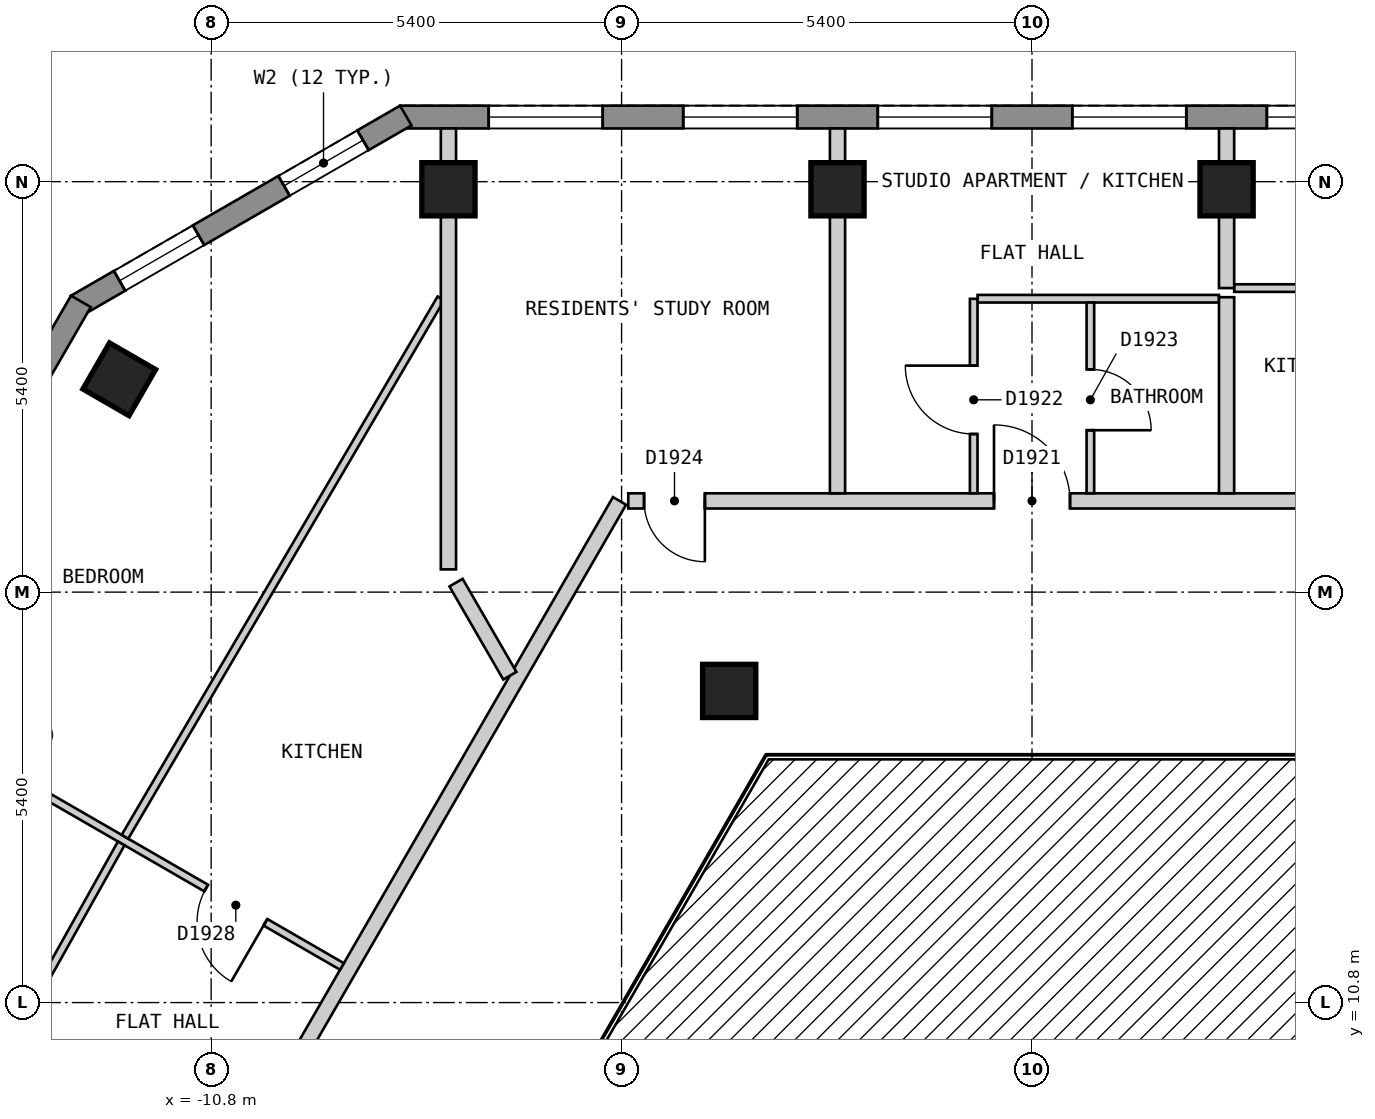
"""IFC4 building model, lengths in metres.
Left out: names, types, materials, properties, quantities, classifications, styles, units other than length and angle.
Written with IfcOpenShell. Run it as: python <this file> out.ifc"""

import sys

from ifc_helpers import new_model, si_unit, direction, frame, frame_2d, origin, origin_2d, place, context, subcontext, project, spatial, polyline, rectangle, outline, extrude, element, fill, save


model = new_model("IFC4")
c1 = context("Model", 3, precision=1e-05, world=origin(), true_north=direction((0.0, 1.0)))
c2 = subcontext(c1, "Body", "Model", "MODEL_VIEW")
j1 = project(units=[si_unit("LENGTHUNIT", "METRE"), si_unit("PLANEANGLEUNIT", "RADIAN")], contexts=[c1])
p1 = place(None, origin())
s1 = spatial("IfcSite", under=j1, at=p1, CompositionType="ELEMENT")
p2 = place(p1, origin())
s2 = spatial("IfcBuilding", under=s1, at=p2, CompositionType="ELEMENT")
p3 = place(p2, frame((0.0, 0.0, 226.8)))
s3 = spatial("IfcBuildingStorey", under=s2, at=p3, CompositionType="ELEMENT", Elevation=226.8)
for number, where, z_axis, x_axis in (
    (1, (2.56, 21.5, 0.0), (0.0, 0.0, 1.0), (-1.0, 0.0, 0.0)),
    (2, (-2.559, 21.5, 0.0), (0.0, 0.0, 1.0), (-1.0, 0.0, 0.0)),
    (3, (-7.678, 21.5, 0.0), (0.0, 0.0, 1.0), (-1.0, 0.0, 0.0)),
    (4, (-12.009, 19.0, 0.0), (0.0, 0.0, 1.0), (-0.5, -0.866, 0.0)),
    (5, (-3.984, 14.9, 0.0), (0.0, 0.0, 1.0), (1.0, 0.0, 0.0)),
):
    element("IfcColumn", number, at=place(p3, frame(where, z_axis=z_axis, x_axis=x_axis)), inside=s3, PredefinedType="COLUMN", context=c2, shape_type="SweptSolid", body=[
        extrude(rectangle(XDim=0.7, YDim=0.7, at=origin_2d()), origin(), (0.0, 0.0, 1.0), 3.0),
    ])
p4 = place(p3, frame((8.314, 22.45, 0.0), z_axis=(0.0, 0.0, 1.0), x_axis=(-1.0, 0.0, 0.0)))
e6 = element("IfcWall", 6, at=p4, inside=s3, PredefinedType="SOLIDWALL", context=c2, shape_type="SweptSolid", body=[
    extrude(outline(polyline([(0.0, -0.15), (16.628, -0.15), (16.548, 0.15), (0.08, 0.15), (0.0, -0.15)])), origin(), (0.0, 0.0, 1.0), 2.7),
])
p5 = place(p4, frame((1.165, 0.0, 0.15)))
e7 = element("IfcOpeningElement", 7, at=p5, cuts=e6, PredefinedType="OPENING", context=c2, shape_type="SweptSolid", body=[
    extrude(rectangle(XDim=1.5, YDim=2.1, at=frame_2d((0.75, 1.05))), frame((0.0, 0.16, 0.0), z_axis=(0.0, -1.0, 0.0), x_axis=(1.0, 0.0, 0.0)), (0.0, 0.0, 1.0), 0.32),
])
p6 = place(p4, frame((3.724, 0.0, 0.15)))
e8 = element("IfcOpeningElement", 8, at=p6, cuts=e6, PredefinedType="OPENING", context=c2, shape_type="SweptSolid", body=[
    extrude(rectangle(XDim=1.5, YDim=2.1, at=frame_2d((0.75, 1.05))), frame((0.0, 0.16, 0.0), z_axis=(0.0, -1.0, 0.0), x_axis=(1.0, 0.0, 0.0)), (0.0, 0.0, 1.0), 0.32),
])
p7 = place(p4, frame((6.284, 0.0, 0.15)))
e9 = element("IfcOpeningElement", 9, at=p7, cuts=e6, PredefinedType="OPENING", context=c2, shape_type="SweptSolid", body=[
    extrude(rectangle(XDim=1.5, YDim=2.1, at=frame_2d((0.75, 1.05))), frame((0.0, 0.16, 0.0), z_axis=(0.0, -1.0, 0.0), x_axis=(1.0, 0.0, 0.0)), (0.0, 0.0, 1.0), 0.32),
])
p8 = place(p4, frame((8.843, 0.0, 0.15)))
e10 = element("IfcOpeningElement", 10, at=p8, cuts=e6, PredefinedType="OPENING", context=c2, shape_type="SweptSolid", body=[
    extrude(rectangle(XDim=1.5, YDim=2.1, at=frame_2d((0.75, 1.05))), frame((0.0, 0.16, 0.0), z_axis=(0.0, -1.0, 0.0), x_axis=(1.0, 0.0, 0.0)), (0.0, 0.0, 1.0), 0.32),
])
p9 = place(p4, frame((11.403, 0.0, 0.15)))
e11 = element("IfcOpeningElement", 11, at=p9, cuts=e6, PredefinedType="OPENING", context=c2, shape_type="SweptSolid", body=[
    extrude(rectangle(XDim=1.5, YDim=2.1, at=frame_2d((0.75, 1.05))), frame((0.0, 0.16, 0.0), z_axis=(0.0, -1.0, 0.0), x_axis=(1.0, 0.0, 0.0)), (0.0, 0.0, 1.0), 0.32),
])
p10 = place(p4, frame((13.962, 0.0, 0.15)))
e12 = element("IfcOpeningElement", 12, at=p10, cuts=e6, PredefinedType="OPENING", context=c2, shape_type="SweptSolid", body=[
    extrude(rectangle(XDim=1.5, YDim=2.1, at=frame_2d((0.75, 1.05))), frame((0.0, 0.16, 0.0), z_axis=(0.0, -1.0, 0.0), x_axis=(1.0, 0.0, 0.0)), (0.0, 0.0, 1.0), 0.32),
])
p11 = place(p3, frame((-8.239, 22.47, 0.0), z_axis=(0.0, 0.0, 1.0), x_axis=(-0.866022959057, -0.500004234368, 0.0)))
e13 = element("IfcWall", 13, at=p11, inside=s3, PredefinedType="SOLIDWALL", context=c2, shape_type="SweptSolid", body=[
    extrude(outline(polyline([(0.0, -0.15), (5.0, -0.15), (4.92, 0.15), (0.08, 0.15), (0.0, -0.15)])), origin(), (0.0, 0.0, 1.0), 2.7),
])
p12 = place(p11, frame((0.65, 0.0, 0.15)))
e14 = element("IfcOpeningElement", 14, at=p12, cuts=e13, PredefinedType="OPENING", context=c2, shape_type="SweptSolid", body=[
    extrude(rectangle(XDim=1.2, YDim=2.1, at=frame_2d((0.6, 1.05))), frame((0.0, 0.16, 0.0), z_axis=(0.0, -1.0, 0.0), x_axis=(1.0, 0.0, 0.0)), (0.0, 0.0, 1.0), 0.32),
])
p13 = place(p11, frame((3.149, 0.0, 0.15)))
e15 = element("IfcOpeningElement", 15, at=p13, cuts=e13, PredefinedType="OPENING", context=c2, shape_type="SweptSolid", body=[
    extrude(rectangle(XDim=1.2, YDim=2.1, at=frame_2d((0.6, 1.05))), frame((0.0, 0.16, 0.0), z_axis=(0.0, -1.0, 0.0), x_axis=(1.0, 0.0, 0.0)), (0.0, 0.0, 1.0), 0.32),
])
p14 = place(p3, frame((-12.514, 20.025, 0.0), z_axis=(0.0, 0.0, 1.0), x_axis=(-0.500003656944, -0.866023292436, 0.0)))
e16 = element("IfcWall", 16, at=p14, inside=s3, PredefinedType="SOLIDWALL", context=c2, shape_type="SweptSolid", body=[
    extrude(outline(polyline([(0.0, -0.15), (22.17, -0.15), (22.09, 0.15), (0.08, 0.15), (0.0, -0.15)])), origin(), (0.0, 0.0, 1.0), 2.7),
])
p15 = place(p14, frame((1.191, 0.0, 0.15)))
e17 = element("IfcOpeningElement", 17, at=p15, cuts=e16, PredefinedType="OPENING", context=c2, shape_type="SweptSolid", body=[
    extrude(rectangle(XDim=1.5, YDim=2.1, at=frame_2d((0.75, 1.05))), frame((0.0, 0.16, 0.0), z_axis=(0.0, -1.0, 0.0), x_axis=(1.0, 0.0, 0.0)), (0.0, 0.0, 1.0), 0.32),
])
p16 = place(p14, frame((3.804, 0.0, 0.15)))
e18 = element("IfcOpeningElement", 18, at=p16, cuts=e16, PredefinedType="OPENING", context=c2, shape_type="SweptSolid", body=[
    extrude(rectangle(XDim=1.5, YDim=2.1, at=frame_2d((0.75, 1.05))), frame((0.0, 0.16, 0.0), z_axis=(0.0, -1.0, 0.0), x_axis=(1.0, 0.0, 0.0)), (0.0, 0.0, 1.0), 0.32),
])
p17 = place(p14, frame((6.416, 0.0, 0.15)))
e19 = element("IfcOpeningElement", 19, at=p17, cuts=e16, PredefinedType="OPENING", context=c2, shape_type="SweptSolid", body=[
    extrude(rectangle(XDim=1.5, YDim=2.1, at=frame_2d((0.75, 1.05))), frame((0.0, 0.16, 0.0), z_axis=(0.0, -1.0, 0.0), x_axis=(1.0, 0.0, 0.0)), (0.0, 0.0, 1.0), 0.32),
])
p18 = place(p14, frame((9.029, 0.0, 0.15)))
e20 = element("IfcOpeningElement", 20, at=p18, cuts=e16, PredefinedType="OPENING", context=c2, shape_type="SweptSolid", body=[
    extrude(rectangle(XDim=1.5, YDim=2.1, at=frame_2d((0.75, 1.05))), frame((0.0, 0.16, 0.0), z_axis=(0.0, -1.0, 0.0), x_axis=(1.0, 0.0, 0.0)), (0.0, 0.0, 1.0), 0.32),
])
p19 = place(p14, frame((11.641, 0.0, 0.15)))
e21 = element("IfcOpeningElement", 21, at=p19, cuts=e16, PredefinedType="OPENING", context=c2, shape_type="SweptSolid", body=[
    extrude(rectangle(XDim=1.5, YDim=2.1, at=frame_2d((0.75, 1.05))), frame((0.0, 0.16, 0.0), z_axis=(0.0, -1.0, 0.0), x_axis=(1.0, 0.0, 0.0)), (0.0, 0.0, 1.0), 0.32),
])
p20 = place(p14, frame((14.254, 0.0, 0.15)))
e22 = element("IfcOpeningElement", 22, at=p20, cuts=e16, PredefinedType="OPENING", context=c2, shape_type="SweptSolid", body=[
    extrude(rectangle(XDim=1.5, YDim=2.1, at=frame_2d((0.75, 1.05))), frame((0.0, 0.16, 0.0), z_axis=(0.0, -1.0, 0.0), x_axis=(1.0, 0.0, 0.0)), (0.0, 0.0, 1.0), 0.32),
])
p21 = place(p14, frame((16.866, 0.0, 0.15)))
e23 = element("IfcOpeningElement", 23, at=p21, cuts=e16, PredefinedType="OPENING", context=c2, shape_type="SweptSolid", body=[
    extrude(rectangle(XDim=1.5, YDim=2.1, at=frame_2d((0.75, 1.05))), frame((0.0, 0.16, 0.0), z_axis=(0.0, -1.0, 0.0), x_axis=(1.0, 0.0, 0.0)), (0.0, 0.0, 1.0), 0.32),
])
p22 = place(p14, frame((19.479, 0.0, 0.15)))
e24 = element("IfcOpeningElement", 24, at=p22, cuts=e16, PredefinedType="OPENING", context=c2, shape_type="SweptSolid", body=[
    extrude(rectangle(XDim=1.5, YDim=2.1, at=frame_2d((0.75, 1.05))), frame((0.0, 0.16, 0.0), z_axis=(0.0, -1.0, 0.0), x_axis=(1.0, 0.0, 0.0)), (0.0, 0.0, 1.0), 0.32),
])
p23 = place(p3, frame((-5.312, 17.4, 0.0), z_axis=(0.0, 0.0, 1.0), x_axis=(1.0, 0.0, 0.0)))
e25 = element("IfcWall", 25, at=p23, inside=s3, PredefinedType="PARTITIONING", context=c2, shape_type="SweptSolid", body=[
    extrude(rectangle(XDim=10.739, YDim=0.2, at=frame_2d((5.37, 0.0))), origin(), (0.0, 0.0, 1.0), 2.7),
])
p24 = place(p23, frame((9.534, 0.0, 0.0)))
e26 = element("IfcOpeningElement", 26, at=p24, cuts=e25, PredefinedType="OPENING", context=c2, shape_type="SweptSolid", body=[
    extrude(rectangle(XDim=1.0, YDim=2.1, at=frame_2d((0.5, 1.05))), frame((0.0, 0.11, 0.0), z_axis=(0.0, -1.0, 0.0), x_axis=(1.0, 0.0, 0.0)), (0.0, 0.0, 1.0), 0.22),
])
p25 = place(p23, frame((4.812, 0.0, 0.0)))
e27 = element("IfcOpeningElement", 27, at=p25, cuts=e25, PredefinedType="OPENING", context=c2, shape_type="SweptSolid", body=[
    extrude(rectangle(XDim=1.0, YDim=2.1, at=frame_2d((0.5, 1.05))), frame((0.0, 0.11, 0.0), z_axis=(0.0, -1.0, 0.0), x_axis=(1.0, 0.0, 0.0)), (0.0, 0.0, 1.0), 0.22),
])
p26 = place(p23, frame((0.208, 0.0, 0.0)))
e28 = element("IfcOpeningElement", 28, at=p26, cuts=e25, PredefinedType="OPENING", context=c2, shape_type="SweptSolid", body=[
    extrude(rectangle(XDim=0.8, YDim=2.1, at=frame_2d((0.4, 1.05))), frame((0.0, 0.11, 0.0), z_axis=(0.0, -1.0, 0.0), x_axis=(1.0, 0.0, 0.0)), (0.0, 0.0, 1.0), 0.22),
])
p27 = place(p3, frame((-10.854, 8.0, 0.0), z_axis=(0.0, 0.0, 1.0), x_axis=(0.499997637144, 0.866026767976, 0.0)))
e29 = element("IfcWall", 29, at=p27, inside=s3, PredefinedType="PARTITIONING", context=c2, shape_type="SweptSolid", body=[
    extrude(rectangle(XDim=10.854, YDim=0.2, at=frame_2d((5.427, 0.0))), origin(), (0.0, 0.0, 1.0), 2.7),
])
p28 = place(p27, frame((0.612, 0.0, 0.0)))
e30 = element("IfcOpeningElement", 30, at=p28, cuts=e29, PredefinedType="OPENING", context=c2, shape_type="SweptSolid", body=[
    extrude(rectangle(XDim=1.0, YDim=2.1, at=frame_2d((0.5, 1.05))), frame((0.0, 0.11, 0.0), z_axis=(0.0, -1.0, 0.0), x_axis=(1.0, 0.0, 0.0)), (0.0, 0.0, 1.0), 0.22),
])
p29 = place(p3, frame((-15.314, 14.875, 0.0), z_axis=(0.0, 0.0, 1.0), x_axis=(0.866001485781, -0.500041424909, 0.0)))
e31 = element("IfcWall", 31, at=p29, inside=s3, PredefinedType="PARTITIONING", context=c2, shape_type="SweptSolid", body=[
    extrude(rectangle(XDim=7.2, YDim=0.1, at=frame_2d((3.6, 0.0))), origin(), (0.0, 0.0, 1.0), 2.7),
])
p30 = place(p29, frame((5.137, 0.0, 0.0)))
e32 = element("IfcOpeningElement", 32, at=p30, cuts=e31, PredefinedType="OPENING", context=c2, shape_type="SweptSolid", body=[
    extrude(rectangle(XDim=0.9, YDim=2.1, at=frame_2d((0.45, 1.05))), frame((0.0, 0.06, 0.0), z_axis=(0.0, -1.0, 0.0), x_axis=(1.0, 0.0, 0.0)), (0.0, 0.0, 1.0), 0.12),
])
p31 = place(p29, frame((1.487, 0.0, 0.0)))
e33 = element("IfcOpeningElement", 33, at=p31, cuts=e31, PredefinedType="OPENING", context=c2, shape_type="SweptSolid", body=[
    extrude(rectangle(XDim=0.9, YDim=2.1, at=frame_2d((0.45, 1.05))), frame((0.0, 0.06, 0.0), z_axis=(0.0, -1.0, 0.0), x_axis=(1.0, 0.0, 0.0)), (0.0, 0.0, 1.0), 0.12),
])
p32 = place(p3, frame((-0.716, 20.06, 0.0), z_axis=(0.0, 0.0, 1.0), x_axis=(1.0, 0.0, 0.0)))
e34 = element("IfcWall", 34, at=p32, inside=s3, PredefinedType="PARTITIONING", context=c2, shape_type="SweptSolid", body=[
    extrude(rectangle(XDim=3.176, YDim=0.1, at=frame_2d((1.588, 0.0))), origin(), (0.0, 0.0, 1.0), 2.7),
])
p33 = place(p3, frame((2.66, 20.2, 0.0), z_axis=(0.0, 0.0, 1.0), x_axis=(1.0, 0.0, 0.0)))
e35 = element("IfcWall", 35, at=p33, inside=s3, PredefinedType="PARTITIONING", context=c2, shape_type="SweptSolid", body=[
    extrude(rectangle(XDim=2.564, YDim=0.1, at=frame_2d((1.282, 0.0))), origin(), (0.0, 0.0, 1.0), 2.7),
])
p34 = place(p3, frame((-11.934, 12.981, 0.0), z_axis=(0.0, 0.0, 1.0), x_axis=(0.506072703404, 0.862490822484, 0.0)))
e36 = element("IfcWall", 36, at=p34, inside=s3, PredefinedType="PARTITIONING", context=c2, shape_type="SweptSolid", body=[
    extrude(rectangle(XDim=8.212, YDim=0.1, at=frame_2d((4.106, 0.0))), origin(), (0.0, 0.0, 1.0), 2.7),
])
p35 = place(p3, frame((-14.522, 8.362, 0.0), z_axis=(0.0, 0.0, 1.0), x_axis=(0.488772229601, 0.872411432508, 0.0)))
e37 = element("IfcWall", 37, at=p35, inside=s3, PredefinedType="PARTITIONING", context=c2, shape_type="SweptSolid", body=[
    extrude(rectangle(XDim=5.195, YDim=0.1, at=frame_2d((2.597, 0.0))), origin(), (0.0, 0.0, 1.0), 2.7),
])
p36 = place(p35, frame((2.173, 0.0, 0.0)))
e38 = element("IfcOpeningElement", 38, at=p36, cuts=e37, PredefinedType="OPENING", context=c2, shape_type="SweptSolid", body=[
    extrude(rectangle(XDim=0.9, YDim=2.1, at=frame_2d((0.45, 1.05))), frame((0.0, 0.06, 0.0), z_axis=(0.0, -1.0, 0.0), x_axis=(1.0, 0.0, 0.0)), (0.0, 0.0, 1.0), 0.12),
])
p37 = place(p3, frame((0.768, 17.5, 0.0), z_axis=(0.0, 0.0, 1.0), x_axis=(0.0, 1.0, 0.0)))
e39 = element("IfcWall", 39, at=p37, inside=s3, PredefinedType="PARTITIONING", context=c2, shape_type="SweptSolid", body=[
    extrude(rectangle(XDim=2.51, YDim=0.1, at=frame_2d((1.255, 0.0))), origin(), (0.0, 0.0, 1.0), 2.7),
])
p38 = place(p37, frame((0.83, 0.0, 0.0)))
e40 = element("IfcOpeningElement", 40, at=p38, cuts=e39, PredefinedType="OPENING", context=c2, shape_type="SweptSolid", body=[
    extrude(rectangle(XDim=0.8, YDim=2.1, at=frame_2d((0.4, 1.05))), frame((0.0, 0.06, 0.0), z_axis=(0.0, -1.0, 0.0), x_axis=(1.0, 0.0, 0.0)), (0.0, 0.0, 1.0), 0.12),
])
p39 = place(p3, frame((-0.767, 17.5, 0.0), z_axis=(0.0, 0.0, 1.0), x_axis=(0.0, 1.0, 0.0)))
e41 = element("IfcWall", 41, at=p39, inside=s3, PredefinedType="PARTITIONING", context=c2, shape_type="SweptSolid", body=[
    extrude(rectangle(XDim=2.559, YDim=0.1, at=frame_2d((1.28, 0.0))), origin(), (0.0, 0.0, 1.0), 2.7),
])
p40 = place(p39, frame((0.78, 0.0, 0.0)))
e42 = element("IfcOpeningElement", 42, at=p40, cuts=e41, PredefinedType="OPENING", context=c2, shape_type="SweptSolid", body=[
    extrude(rectangle(XDim=0.9, YDim=2.1, at=frame_2d((0.45, 1.05))), frame((0.0, 0.06, 0.0), z_axis=(0.0, -1.0, 0.0), x_axis=(1.0, 0.0, 0.0)), (0.0, 0.0, 1.0), 0.12),
])
p41 = place(p3, frame((-7.578, 16.325, 0.0), z_axis=(0.0, 0.0, 1.0), x_axis=(0.500314976313, -0.865843475737, 0.0)))
e43 = element("IfcWall", 43, at=p41, inside=s3, PredefinedType="PARTITIONING", context=c2, shape_type="SweptSolid", body=[
    extrude(rectangle(XDim=1.415, YDim=0.2, at=frame_2d((0.707, 0.0))), origin(), (0.0, 0.0, 1.0), 2.7),
])
p42 = place(p3, frame((-2.559, 22.3, 0.0), z_axis=(0.0, 0.0, 1.0), x_axis=(0.0, -1.0, 0.0)))
e44 = element("IfcWall", 44, at=p42, inside=s3, PredefinedType="PARTITIONING", context=c2, shape_type="SweptSolid", body=[
    extrude(rectangle(XDim=4.8, YDim=0.2, at=frame_2d((2.4, 0.0))), origin(), (0.0, 0.0, 1.0), 2.7),
])
p43 = place(p3, frame((2.56, 20.08, 0.0), z_axis=(0.0, 0.0, 1.0), x_axis=(0.0, -1.0, 0.0)))
e45 = element("IfcWall", 45, at=p43, inside=s3, PredefinedType="PARTITIONING", context=c2, shape_type="SweptSolid", body=[
    extrude(rectangle(XDim=2.58, YDim=0.2, at=frame_2d((1.29, 0.0))), origin(), (0.0, 0.0, 1.0), 2.7),
])
p44 = place(p3, frame((2.56, 20.2, 0.0), z_axis=(0.0, 0.0, 1.0), x_axis=(0.0, 1.0, 0.0)))
e46 = element("IfcWall", 46, at=p44, inside=s3, PredefinedType="PARTITIONING", context=c2, shape_type="SweptSolid", body=[
    extrude(rectangle(XDim=2.1, YDim=0.2, at=frame_2d((1.05, 0.0))), origin(), (0.0, 0.0, 1.0), 2.7),
])
p45 = place(p3, frame((-7.678, 16.499, 0.0), z_axis=(0.0, 0.0, 1.0), x_axis=(0.0, 1.0, 0.0)))
e47 = element("IfcWall", 47, at=p45, inside=s3, PredefinedType="PARTITIONING", context=c2, shape_type="SweptSolid", body=[
    extrude(rectangle(XDim=5.801, YDim=0.2, at=frame_2d((2.9, 0.0))), origin(), (0.0, 0.0, 1.0), 2.7),
])
p46 = place(p6, origin())
e48 = element("IfcWindow", 48, at=p46, inside=s3, PartitioningType="SINGLE_PANEL", PredefinedType="WINDOW", context=c2, shape_type="SweptSolid", body=[
    extrude(rectangle(XDim=1.5, YDim=2.1, at=frame_2d((0.75, 1.05))), frame((0.0, 0.03, 0.0), z_axis=(0.0, -1.0, 0.0), x_axis=(1.0, 0.0, 0.0)), (0.0, 0.0, 1.0), 0.06),
])
fill(e8, e48)
p47 = place(p7, origin())
e49 = element("IfcWindow", 49, at=p47, inside=s3, PartitioningType="SINGLE_PANEL", PredefinedType="WINDOW", context=c2, shape_type="SweptSolid", body=[
    extrude(rectangle(XDim=1.5, YDim=2.1, at=frame_2d((0.75, 1.05))), frame((0.0, 0.03, 0.0), z_axis=(0.0, -1.0, 0.0), x_axis=(1.0, 0.0, 0.0)), (0.0, 0.0, 1.0), 0.06),
])
fill(e9, e49)
p48 = place(p8, origin())
e50 = element("IfcWindow", 50, at=p48, inside=s3, PartitioningType="SINGLE_PANEL", PredefinedType="WINDOW", context=c2, shape_type="SweptSolid", body=[
    extrude(rectangle(XDim=1.5, YDim=2.1, at=frame_2d((0.75, 1.05))), frame((0.0, 0.03, 0.0), z_axis=(0.0, -1.0, 0.0), x_axis=(1.0, 0.0, 0.0)), (0.0, 0.0, 1.0), 0.06),
])
fill(e10, e50)
p49 = place(p9, origin())
e51 = element("IfcWindow", 51, at=p49, inside=s3, PartitioningType="SINGLE_PANEL", PredefinedType="WINDOW", context=c2, shape_type="SweptSolid", body=[
    extrude(rectangle(XDim=1.5, YDim=2.1, at=frame_2d((0.75, 1.05))), frame((0.0, 0.03, 0.0), z_axis=(0.0, -1.0, 0.0), x_axis=(1.0, 0.0, 0.0)), (0.0, 0.0, 1.0), 0.06),
])
fill(e11, e51)
p50 = place(p10, origin())
e52 = element("IfcWindow", 52, at=p50, inside=s3, PartitioningType="SINGLE_PANEL", PredefinedType="WINDOW", context=c2, shape_type="SweptSolid", body=[
    extrude(rectangle(XDim=1.5, YDim=2.1, at=frame_2d((0.75, 1.05))), frame((0.0, 0.03, 0.0), z_axis=(0.0, -1.0, 0.0), x_axis=(1.0, 0.0, 0.0)), (0.0, 0.0, 1.0), 0.06),
])
fill(e12, e52)
p51 = place(p12, origin())
e53 = element("IfcWindow", 53, at=p51, inside=s3, PartitioningType="SINGLE_PANEL", PredefinedType="WINDOW", context=c2, shape_type="SweptSolid", body=[
    extrude(rectangle(XDim=1.2, YDim=2.1, at=frame_2d((0.6, 1.05))), frame((0.0, 0.03, 0.0), z_axis=(0.0, -1.0, 0.0), x_axis=(1.0, 0.0, 0.0)), (0.0, 0.0, 1.0), 0.06),
])
fill(e14, e53)
p52 = place(p13, origin())
e54 = element("IfcWindow", 54, at=p52, inside=s3, PartitioningType="SINGLE_PANEL", PredefinedType="WINDOW", context=c2, shape_type="SweptSolid", body=[
    extrude(rectangle(XDim=1.2, YDim=2.1, at=frame_2d((0.6, 1.05))), frame((0.0, 0.03, 0.0), z_axis=(0.0, -1.0, 0.0), x_axis=(1.0, 0.0, 0.0)), (0.0, 0.0, 1.0), 0.06),
])
fill(e15, e54)
p53 = place(p25, origin())
e55 = element("IfcDoor", 55, at=p53, inside=s3, OperationType="SINGLE_SWING_LEFT", PredefinedType="DOOR", context=c2, shape_type="SweptSolid", body=[
    extrude(rectangle(XDim=1.0, YDim=2.1, at=frame_2d((0.5, 1.05))), frame((0.0, 0.025, 0.0), z_axis=(0.0, -1.0, 0.0), x_axis=(1.0, 0.0, 0.0)), (0.0, 0.0, 1.0), 0.05),
])
fill(e27, e55)
p54 = place(p40, origin())
e56 = element("IfcDoor", 56, at=p54, inside=s3, OperationType="SINGLE_SWING_RIGHT", PredefinedType="DOOR", context=c2, shape_type="SweptSolid", body=[
    extrude(rectangle(XDim=0.9, YDim=2.1, at=frame_2d((0.45, 1.05))), frame((0.0, 0.025, 0.0), z_axis=(0.0, -1.0, 0.0), x_axis=(1.0, 0.0, 0.0)), (0.0, 0.0, 1.0), 0.05),
])
fill(e42, e56)
p55 = place(p38, origin())
e57 = element("IfcDoor", 57, at=p55, inside=s3, OperationType="SINGLE_SWING_LEFT", PredefinedType="DOOR", context=c2, shape_type="SweptSolid", body=[
    extrude(rectangle(XDim=0.8, YDim=2.1, at=frame_2d((0.4, 1.05))), frame((0.0, 0.025, 0.0), z_axis=(0.0, -1.0, 0.0), x_axis=(1.0, 0.0, 0.0)), (0.0, 0.0, 1.0), 0.05),
])
fill(e40, e57)
p56 = place(p26, origin())
e58 = element("IfcDoor", 58, at=p56, inside=s3, OperationType="SINGLE_SWING_RIGHT", PredefinedType="DOOR", context=c2, shape_type="SweptSolid", body=[
    extrude(rectangle(XDim=0.8, YDim=2.1, at=frame_2d((0.4, 1.05))), frame((0.0, 0.025, 0.0), z_axis=(0.0, -1.0, 0.0), x_axis=(1.0, 0.0, 0.0)), (0.0, 0.0, 1.0), 0.05),
])
fill(e28, e58)
p57 = place(p30, origin())
e59 = element("IfcDoor", 59, at=p57, inside=s3, OperationType="SINGLE_SWING_RIGHT", PredefinedType="DOOR", context=c2, shape_type="SweptSolid", body=[
    extrude(rectangle(XDim=0.9, YDim=2.1, at=frame_2d((0.45, 1.05))), frame((0.0, 0.025, 0.0), z_axis=(0.0, -1.0, 0.0), x_axis=(1.0, 0.0, 0.0)), (0.0, 0.0, 1.0), 0.05),
])
fill(e32, e59)
save(model, sys.argv[1])
